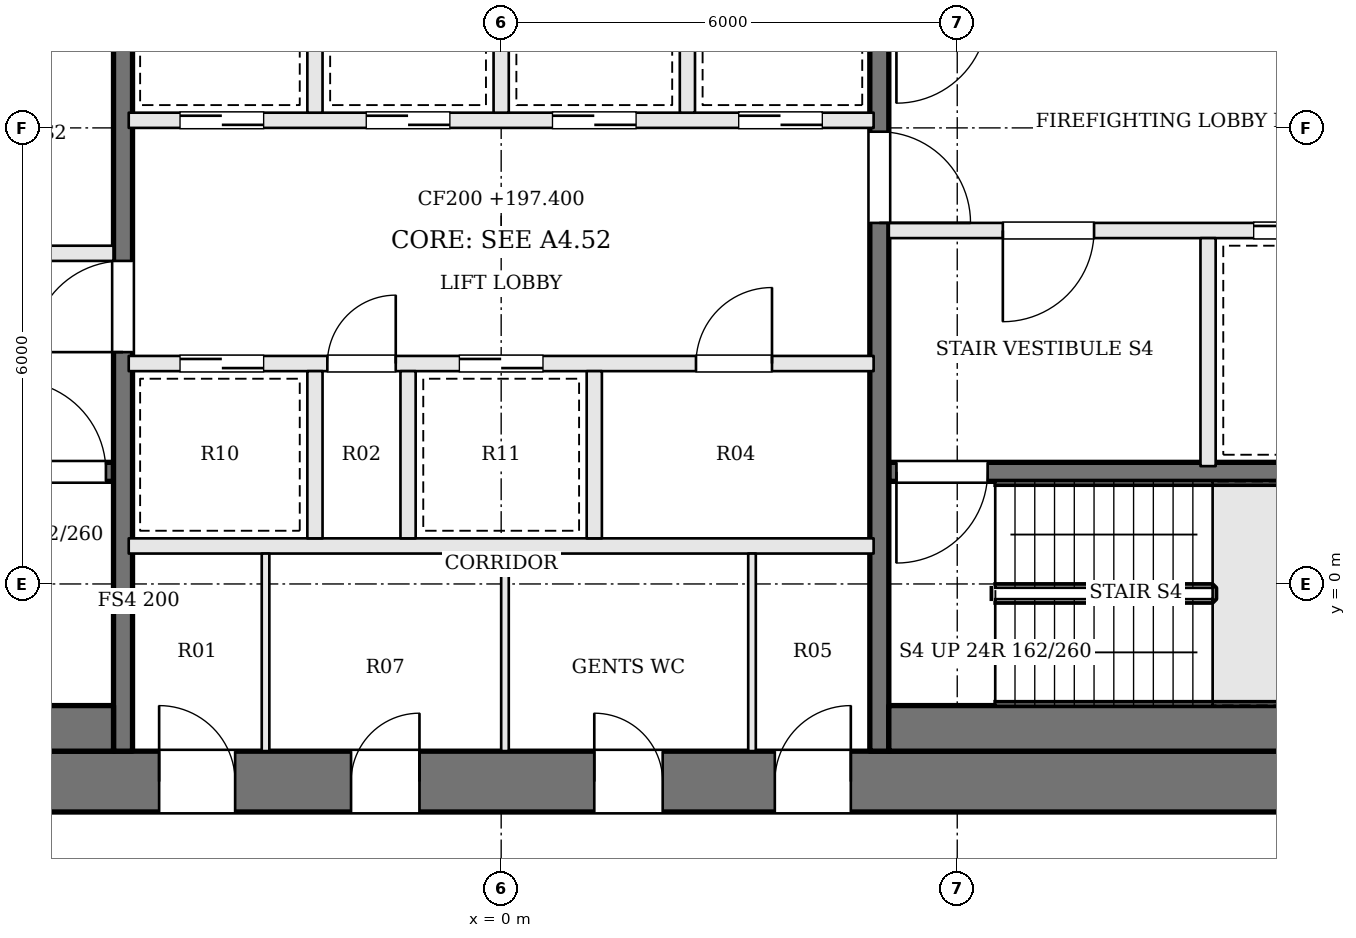
"""IFC4 building model, lengths in metres.
Left out: names, types, materials, properties, quantities, classifications, styles, units other than length and angle.
Written with IfcOpenShell. Run it as: python <this file> out.ifc"""

import sys

from ifc_helpers import new_model, si_unit, direction, frame, frame_2d, origin, place, context, subcontext, project, spatial, rectangle, extrude, element, fill, save


model = new_model("IFC4")
c1 = context("Model", 3, precision=1e-05, world=origin(), true_north=direction((0.0, 1.0)))
c2 = subcontext(c1, "Body", "Model", "MODEL_VIEW")
j1 = project(units=[si_unit("LENGTHUNIT", "METRE"), si_unit("PLANEANGLEUNIT", "RADIAN")], contexts=[c1])
p1 = place(None, origin())
s1 = spatial("IfcSite", under=j1, at=p1, CompositionType="ELEMENT")
p2 = place(p1, origin())
s2 = spatial("IfcBuilding", under=s1, at=p2, CompositionType="ELEMENT")
p3 = place(p2, frame((0.0, 0.0, 197.4)))
s3 = spatial("IfcBuildingStorey", under=s2, at=p3, CompositionType="ELEMENT", Elevation=197.4)
p4 = place(p3, frame((-13.0, -2.6, 0.0), z_axis=(0.0, 0.0, 1.0), x_axis=(1.0, 0.0, 0.0)))
e1 = element("IfcWall", 1, at=p4, inside=s3, PredefinedType="SHEAR", context=c2, shape_type="SweptSolid", body=[
    extrude(rectangle(XDim=26.0, YDim=0.8, at=frame_2d((13.0, 0.0))), origin(), (0.0, 0.0, 1.0), 3.9),
])
p5 = place(p4, frame((8.5, 0.0, 0.0)))
e2 = element("IfcOpeningElement", 2, at=p5, cuts=e1, PredefinedType="OPENING", context=c2, shape_type="SweptSolid", body=[
    extrude(rectangle(XDim=1.0, YDim=2.1, at=frame_2d((0.5, 1.05))), frame((0.0, 0.41, 0.0), z_axis=(0.0, -1.0, 0.0), x_axis=(1.0, 0.0, 0.0)), (0.0, 0.0, 1.0), 0.82),
])
p6 = place(p4, frame((11.025, 0.0, 0.0)))
e3 = element("IfcOpeningElement", 3, at=p6, cuts=e1, PredefinedType="OPENING", context=c2, shape_type="SweptSolid", body=[
    extrude(rectangle(XDim=0.9, YDim=2.1, at=frame_2d((0.45, 1.05))), frame((0.0, 0.41, 0.0), z_axis=(0.0, -1.0, 0.0), x_axis=(1.0, 0.0, 0.0)), (0.0, 0.0, 1.0), 0.82),
])
p7 = place(p4, frame((14.225, 0.0, 0.0)))
e4 = element("IfcOpeningElement", 4, at=p7, cuts=e1, PredefinedType="OPENING", context=c2, shape_type="SweptSolid", body=[
    extrude(rectangle(XDim=0.9, YDim=2.1, at=frame_2d((0.45, 1.05))), frame((0.0, 0.41, 0.0), z_axis=(0.0, -1.0, 0.0), x_axis=(1.0, 0.0, 0.0)), (0.0, 0.0, 1.0), 0.82),
])
p8 = place(p4, frame((16.6, 0.0, 0.0)))
e5 = element("IfcOpeningElement", 5, at=p8, cuts=e1, PredefinedType="OPENING", context=c2, shape_type="SweptSolid", body=[
    extrude(rectangle(XDim=1.0, YDim=2.1, at=frame_2d((0.5, 1.05))), frame((0.0, 0.41, 0.0), z_axis=(0.0, -1.0, 0.0), x_axis=(1.0, 0.0, 0.0)), (0.0, 0.0, 1.0), 0.82),
])
p9 = place(p3, frame((-12.2, 1.475, 0.0), z_axis=(0.0, 0.0, 1.0), x_axis=(1.0, 0.0, 0.0)))
e6 = element("IfcWall", 6, at=p9, inside=s3, PredefinedType="SOLIDWALL", context=c2, shape_type="SweptSolid", body=[
    extrude(rectangle(XDim=7.1, YDim=0.25, at=frame_2d((3.55, 0.0))), origin(), (0.0, 0.0, 1.0), 3.7),
])
p10 = place(p9, frame((5.8, 0.0, 0.0)))
e7 = element("IfcOpeningElement", 7, at=p10, cuts=e6, PredefinedType="OPENING", context=c2, shape_type="SweptSolid", body=[
    extrude(rectangle(XDim=1.2, YDim=2.1, at=frame_2d((0.6, 1.05))), frame((0.0, 0.135, 0.0), z_axis=(0.0, -1.0, 0.0), x_axis=(1.0, 0.0, 0.0)), (0.0, 0.0, 1.0), 0.27),
])
p11 = place(p3, frame((-12.2, 4.35, 0.0), z_axis=(0.0, 0.0, 1.0), x_axis=(1.0, 0.0, 0.0)))
e8 = element("IfcWall", 8, at=p11, inside=s3, PredefinedType="SOLIDWALL", context=c2, shape_type="SweptSolid", body=[
    extrude(rectangle(XDim=7.1, YDim=0.2, at=frame_2d((3.55, 0.0))), origin(), (0.0, 0.0, 1.0), 3.7),
])
p12 = place(p11, frame((4.4, 0.0, 0.0)))
e9 = element("IfcOpeningElement", 9, at=p12, cuts=e8, PredefinedType="OPENING", context=c2, shape_type="SweptSolid", body=[
    extrude(rectangle(XDim=1.2, YDim=2.1, at=frame_2d((0.6, 1.05))), frame((0.0, 0.11, 0.0), z_axis=(0.0, -1.0, 0.0), x_axis=(1.0, 0.0, 0.0)), (0.0, 0.0, 1.0), 0.22),
])
p13 = place(p11, frame((1.1, 0.0, 0.0)))
e10 = element("IfcOpeningElement", 10, at=p13, cuts=e8, PredefinedType="OPENING", context=c2, shape_type="SweptSolid", body=[
    extrude(rectangle(XDim=1.2, YDim=2.1, at=frame_2d((0.6, 1.05))), frame((0.0, 0.11, 0.0), z_axis=(0.0, -1.0, 0.0), x_axis=(1.0, 0.0, 0.0)), (0.0, 0.0, 1.0), 0.22),
])
p14 = place(p3, frame((12.2, 4.65, 0.0), z_axis=(0.0, 0.0, 1.0), x_axis=(-1.0, 0.0, 0.0)))
e11 = element("IfcWall", 11, at=p14, inside=s3, PredefinedType="SOLIDWALL", context=c2, shape_type="SweptSolid", body=[
    extrude(rectangle(XDim=7.1, YDim=0.2, at=frame_2d((3.55, 0.0))), origin(), (0.0, 0.0, 1.0), 3.7),
])
p15 = place(p14, frame((4.4, 0.0, 0.0)))
e12 = element("IfcOpeningElement", 12, at=p15, cuts=e11, PredefinedType="OPENING", context=c2, shape_type="SweptSolid", body=[
    extrude(rectangle(XDim=1.2, YDim=2.1, at=frame_2d((0.6, 1.05))), frame((0.0, 0.11, 0.0), z_axis=(0.0, -1.0, 0.0), x_axis=(1.0, 0.0, 0.0)), (0.0, 0.0, 1.0), 0.22),
])
p16 = place(p14, frame((1.1, 0.0, 0.0)))
e13 = element("IfcOpeningElement", 13, at=p16, cuts=e11, PredefinedType="OPENING", context=c2, shape_type="SweptSolid", body=[
    extrude(rectangle(XDim=1.2, YDim=2.1, at=frame_2d((0.6, 1.05))), frame((0.0, 0.11, 0.0), z_axis=(0.0, -1.0, 0.0), x_axis=(1.0, 0.0, 0.0)), (0.0, 0.0, 1.0), 0.22),
])
p17 = place(p3, frame((12.2, 1.475, 0.0), z_axis=(0.0, 0.0, 1.0), x_axis=(-1.0, 0.0, 0.0)))
e14 = element("IfcWall", 14, at=p17, inside=s3, PredefinedType="SOLIDWALL", context=c2, shape_type="SweptSolid", body=[
    extrude(rectangle(XDim=7.1, YDim=0.25, at=frame_2d((3.55, 0.0))), origin(), (0.0, 0.0, 1.0), 3.7),
])
p18 = place(p17, frame((5.8, 0.0, 0.0)))
e15 = element("IfcOpeningElement", 15, at=p18, cuts=e14, PredefinedType="OPENING", context=c2, shape_type="SweptSolid", body=[
    extrude(rectangle(XDim=1.2, YDim=2.1, at=frame_2d((0.6, 1.05))), frame((0.0, 0.135, 0.0), z_axis=(0.0, -1.0, 0.0), x_axis=(1.0, 0.0, 0.0)), (0.0, 0.0, 1.0), 0.27),
])
p19 = place(p3, frame((9.3, 4.55, 0.0), z_axis=(0.0, 0.0, 1.0), x_axis=(0.0, -1.0, 0.0)))
e16 = element("IfcWall", 16, at=p19, inside=s3, PredefinedType="SOLIDWALL", context=c2, shape_type="SweptSolid", body=[
    extrude(rectangle(XDim=3.0, YDim=0.2, at=frame_2d((1.5, 0.0))), origin(), (0.0, 0.0, 1.0), 3.7),
])
p20 = place(p3, frame((-4.975, -2.2, 0.0), z_axis=(0.0, 0.0, 1.0), x_axis=(0.0, 1.0, 0.0)))
e17 = element("IfcWall", 17, at=p20, inside=s3, PredefinedType="SOLIDWALL", context=c2, shape_type="SweptSolid", body=[
    extrude(rectangle(XDim=13.4, YDim=0.25, at=frame_2d((6.7, 0.0))), origin(), (0.0, 0.0, 1.0), 3.7),
])
p21 = place(p20, frame((5.25, 0.0, 0.0)))
e18 = element("IfcOpeningElement", 18, at=p21, cuts=e17, PredefinedType="OPENING", context=c2, shape_type="SweptSolid", body=[
    extrude(rectangle(XDim=1.2, YDim=2.1, at=frame_2d((0.6, 1.05))), frame((0.0, 0.135, 0.0), z_axis=(0.0, -1.0, 0.0), x_axis=(1.0, 0.0, 0.0)), (0.0, 0.0, 1.0), 0.27),
])
p22 = place(p3, frame((4.975, 11.2, 0.0), z_axis=(0.0, 0.0, 1.0), x_axis=(0.0, -1.0, 0.0)))
e19 = element("IfcWall", 19, at=p22, inside=s3, PredefinedType="SOLIDWALL", context=c2, shape_type="SweptSolid", body=[
    extrude(rectangle(XDim=13.4, YDim=0.25, at=frame_2d((6.7, 0.0))), origin(), (0.0, 0.0, 1.0), 3.7),
])
p23 = place(p22, frame((5.25, 0.0, 0.0)))
e20 = element("IfcOpeningElement", 20, at=p23, cuts=e19, PredefinedType="OPENING", context=c2, shape_type="SweptSolid", body=[
    extrude(rectangle(XDim=1.2, YDim=2.1, at=frame_2d((0.6, 1.05))), frame((0.0, 0.135, 0.0), z_axis=(0.0, -1.0, 0.0), x_axis=(1.0, 0.0, 0.0)), (0.0, 0.0, 1.0), 0.27),
])
for number, where, z_axis, x_axis in (
    (21, (-12.2, -1.9, 0.0), (0.0, 0.0, 1.0), (1.0, 0.0, 0.0)),
    (22, (12.2, -1.9, 0.0), (0.0, 0.0, 1.0), (-1.0, 0.0, 0.0)),
):
    element("IfcWall", number, at=place(p3, frame(where, z_axis=z_axis, x_axis=x_axis)), inside=s3, PredefinedType="SOLIDWALL", context=c2, shape_type="SweptSolid", body=[
        extrude(rectangle(XDim=7.1, YDim=0.6, at=frame_2d((3.55, 0.0))), origin(), (0.0, 0.0, 1.0), 3.7),
    ])
p24 = place(p3, frame((-4.9, 0.5, 0.0), z_axis=(0.0, 0.0, 1.0), x_axis=(1.0, 0.0, 0.0)))
e23 = element("IfcWall", 23, at=p24, inside=s3, PredefinedType="SOLIDWALL", context=c2, shape_type="SweptSolid", body=[
    extrude(rectangle(XDim=9.8, YDim=0.2, at=frame_2d((4.9, 0.0))), origin(), (0.0, 0.0, 1.0), 3.7),
])
p25 = place(p3, frame((-4.9, 2.9, 0.0), z_axis=(0.0, 0.0, 1.0), x_axis=(1.0, 0.0, 0.0)))
e24 = element("IfcWall", 24, at=p25, inside=s3, PredefinedType="SOLIDWALL", context=c2, shape_type="SweptSolid", body=[
    extrude(rectangle(XDim=9.8, YDim=0.2, at=frame_2d((4.9, 0.0))), origin(), (0.0, 0.0, 1.0), 3.7),
])
p26 = place(p25, frame((0.675, 0.0, 0.0)))
e25 = element("IfcOpeningElement", 25, at=p26, cuts=e24, PredefinedType="OPENING", context=c2, shape_type="SweptSolid", body=[
    extrude(rectangle(XDim=1.1, YDim=2.1, at=frame_2d((0.55, 1.05))), frame((0.0, 0.11, 0.0), z_axis=(0.0, -1.0, 0.0), x_axis=(1.0, 0.0, 0.0)), (0.0, 0.0, 1.0), 0.22),
])
p27 = place(p25, frame((2.613, 0.0, 0.0)))
e26 = element("IfcOpeningElement", 26, at=p27, cuts=e24, PredefinedType="OPENING", context=c2, shape_type="SweptSolid", body=[
    extrude(rectangle(XDim=0.9, YDim=2.1, at=frame_2d((0.45, 1.05))), frame((0.0, 0.11, 0.0), z_axis=(0.0, -1.0, 0.0), x_axis=(1.0, 0.0, 0.0)), (0.0, 0.0, 1.0), 0.22),
])
p28 = place(p25, frame((4.35, 0.0, 0.0)))
e27 = element("IfcOpeningElement", 27, at=p28, cuts=e24, PredefinedType="OPENING", context=c2, shape_type="SweptSolid", body=[
    extrude(rectangle(XDim=1.1, YDim=2.1, at=frame_2d((0.55, 1.05))), frame((0.0, 0.11, 0.0), z_axis=(0.0, -1.0, 0.0), x_axis=(1.0, 0.0, 0.0)), (0.0, 0.0, 1.0), 0.22),
])
p29 = place(p25, frame((7.463, 0.0, 0.0)))
e28 = element("IfcOpeningElement", 28, at=p29, cuts=e24, PredefinedType="OPENING", context=c2, shape_type="SweptSolid", body=[
    extrude(rectangle(XDim=1.0, YDim=2.1, at=frame_2d((0.5, 1.05))), frame((0.0, 0.11, 0.0), z_axis=(0.0, -1.0, 0.0), x_axis=(1.0, 0.0, 0.0)), (0.0, 0.0, 1.0), 0.22),
])
p30 = place(p3, frame((-4.9, 6.1, 0.0), z_axis=(0.0, 0.0, 1.0), x_axis=(1.0, 0.0, 0.0)))
e29 = element("IfcWall", 29, at=p30, inside=s3, PredefinedType="SOLIDWALL", context=c2, shape_type="SweptSolid", body=[
    extrude(rectangle(XDim=9.8, YDim=0.2, at=frame_2d((4.9, 0.0))), origin(), (0.0, 0.0, 1.0), 3.7),
])
p31 = place(p30, frame((0.675, 0.0, 0.0)))
e30 = element("IfcOpeningElement", 30, at=p31, cuts=e29, PredefinedType="OPENING", context=c2, shape_type="SweptSolid", body=[
    extrude(rectangle(XDim=1.1, YDim=2.1, at=frame_2d((0.55, 1.05))), frame((0.0, 0.11, 0.0), z_axis=(0.0, -1.0, 0.0), x_axis=(1.0, 0.0, 0.0)), (0.0, 0.0, 1.0), 0.22),
])
p32 = place(p30, frame((3.125, 0.0, 0.0)))
e31 = element("IfcOpeningElement", 31, at=p32, cuts=e29, PredefinedType="OPENING", context=c2, shape_type="SweptSolid", body=[
    extrude(rectangle(XDim=1.1, YDim=2.1, at=frame_2d((0.55, 1.05))), frame((0.0, 0.11, 0.0), z_axis=(0.0, -1.0, 0.0), x_axis=(1.0, 0.0, 0.0)), (0.0, 0.0, 1.0), 0.22),
])
p33 = place(p30, frame((5.575, 0.0, 0.0)))
e32 = element("IfcOpeningElement", 32, at=p33, cuts=e29, PredefinedType="OPENING", context=c2, shape_type="SweptSolid", body=[
    extrude(rectangle(XDim=1.1, YDim=2.1, at=frame_2d((0.55, 1.05))), frame((0.0, 0.11, 0.0), z_axis=(0.0, -1.0, 0.0), x_axis=(1.0, 0.0, 0.0)), (0.0, 0.0, 1.0), 0.22),
])
p34 = place(p30, frame((8.025, 0.0, 0.0)))
e33 = element("IfcOpeningElement", 33, at=p34, cuts=e29, PredefinedType="OPENING", context=c2, shape_type="SweptSolid", body=[
    extrude(rectangle(XDim=1.1, YDim=2.1, at=frame_2d((0.55, 1.05))), frame((0.0, 0.11, 0.0), z_axis=(0.0, -1.0, 0.0), x_axis=(1.0, 0.0, 0.0)), (0.0, 0.0, 1.0), 0.22),
])
for number, where, z_axis, x_axis in (
    (34, (-2.45, 0.6, 0.0), (0.0, 0.0, 1.0), (0.0, 1.0, 0.0)),
    (35, (-1.225, 0.6, 0.0), (0.0, 0.0, 1.0), (0.0, 1.0, 0.0)),
    (36, (1.225, 0.6, 0.0), (0.0, 0.0, 1.0), (0.0, 1.0, 0.0)),
    (37, (-2.45, 6.2, 0.0), (0.0, 0.0, 1.0), (0.0, 1.0, 0.0)),
    (38, (0.0, 6.2, 0.0), (0.0, 0.0, 1.0), (0.0, 1.0, 0.0)),
    (39, (2.45, 6.2, 0.0), (0.0, 0.0, 1.0), (0.0, 1.0, 0.0)),
):
    element("IfcWall", number, at=place(p3, frame(where, z_axis=z_axis, x_axis=x_axis)), inside=s3, PredefinedType="SOLIDWALL", context=c2, shape_type="SweptSolid", body=[
        extrude(rectangle(XDim=2.2, YDim=0.2, at=frame_2d((1.1, 0.0))), origin(), (0.0, 0.0, 1.0), 3.7),
    ])
for number, where, z_axis, x_axis in (
    (40, (-3.1, -2.2, 0.0), (0.0, 0.0, 1.0), (0.0, 1.0, 0.0)),
    (41, (0.05, -2.2, 0.0), (0.0, 0.0, 1.0), (0.0, 1.0, 0.0)),
    (42, (3.3, -2.2, 0.0), (0.0, 0.0, 1.0), (0.0, 1.0, 0.0)),
):
    element("IfcWall", number, at=place(p3, frame(where, z_axis=z_axis, x_axis=x_axis)), inside=s3, PredefinedType="PARTITIONING", context=c2, shape_type="SweptSolid", body=[
        extrude(rectangle(XDim=2.6, YDim=0.1, at=frame_2d((1.3, 0.0))), origin(), (0.0, 0.0, 1.0), 3.7),
    ])
p35 = place(p21, origin())
e43 = element("IfcDoor", 43, at=p35, inside=s3, OperationType="SINGLE_SWING_LEFT", PredefinedType="DOOR", context=c2, shape_type="SweptSolid", body=[
    extrude(rectangle(XDim=1.2, YDim=2.1, at=frame_2d((0.6, 1.05))), frame((0.0, 0.025, 0.0), z_axis=(0.0, -1.0, 0.0), x_axis=(1.0, 0.0, 0.0)), (0.0, 0.0, 1.0), 0.05),
])
fill(e18, e43)
p36 = place(p23, origin())
e44 = element("IfcDoor", 44, at=p36, inside=s3, OperationType="SINGLE_SWING_RIGHT", PredefinedType="DOOR", context=c2, shape_type="SweptSolid", body=[
    extrude(rectangle(XDim=1.2, YDim=2.1, at=frame_2d((0.6, 1.05))), frame((0.0, 0.025, 0.0), z_axis=(0.0, -1.0, 0.0), x_axis=(1.0, 0.0, 0.0)), (0.0, 0.0, 1.0), 0.05),
])
fill(e20, e44)
p37 = place(p15, origin())
e45 = element("IfcDoor", 45, at=p37, inside=s3, OperationType="SINGLE_SWING_RIGHT", PredefinedType="DOOR", context=c2, shape_type="SweptSolid", body=[
    extrude(rectangle(XDim=1.2, YDim=2.1, at=frame_2d((0.6, 1.05))), frame((0.0, 0.025, 0.0), z_axis=(0.0, -1.0, 0.0), x_axis=(1.0, 0.0, 0.0)), (0.0, 0.0, 1.0), 0.05),
])
fill(e12, e45)
p38 = place(p10, origin())
e46 = element("IfcDoor", 46, at=p38, inside=s3, OperationType="SINGLE_SWING_LEFT", PredefinedType="DOOR", context=c2, shape_type="SweptSolid", body=[
    extrude(rectangle(XDim=1.2, YDim=2.1, at=frame_2d((0.6, 1.05))), frame((0.0, 0.025, 0.0), z_axis=(0.0, -1.0, 0.0), x_axis=(1.0, 0.0, 0.0)), (0.0, 0.0, 1.0), 0.05),
])
fill(e7, e46)
p39 = place(p18, origin())
e47 = element("IfcDoor", 47, at=p39, inside=s3, OperationType="SINGLE_SWING_RIGHT", PredefinedType="DOOR", context=c2, shape_type="SweptSolid", body=[
    extrude(rectangle(XDim=1.2, YDim=2.1, at=frame_2d((0.6, 1.05))), frame((0.0, 0.025, 0.0), z_axis=(0.0, -1.0, 0.0), x_axis=(1.0, 0.0, 0.0)), (0.0, 0.0, 1.0), 0.05),
])
fill(e15, e47)
p40 = place(p16, origin())
e48 = element("IfcDoor", 48, at=p40, inside=s3, OperationType="SLIDING_TO_RIGHT", PredefinedType="DOOR", context=c2, shape_type="SweptSolid", body=[
    extrude(rectangle(XDim=1.2, YDim=2.1, at=frame_2d((0.6, 1.05))), frame((0.0, 0.025, 0.0), z_axis=(0.0, -1.0, 0.0), x_axis=(1.0, 0.0, 0.0)), (0.0, 0.0, 1.0), 0.05),
])
fill(e13, e48)
p41 = place(p26, origin())
e49 = element("IfcDoor", 49, at=p41, inside=s3, OperationType="SLIDING_TO_RIGHT", PredefinedType="DOOR", context=c2, shape_type="SweptSolid", body=[
    extrude(rectangle(XDim=1.1, YDim=2.1, at=frame_2d((0.55, 1.05))), frame((0.0, 0.025, 0.0), z_axis=(0.0, -1.0, 0.0), x_axis=(1.0, 0.0, 0.0)), (0.0, 0.0, 1.0), 0.05),
])
fill(e25, e49)
p42 = place(p27, origin())
e50 = element("IfcDoor", 50, at=p42, inside=s3, OperationType="SINGLE_SWING_RIGHT", PredefinedType="DOOR", context=c2, shape_type="SweptSolid", body=[
    extrude(rectangle(XDim=0.9, YDim=2.1, at=frame_2d((0.45, 1.05))), frame((0.0, 0.025, 0.0), z_axis=(0.0, -1.0, 0.0), x_axis=(1.0, 0.0, 0.0)), (0.0, 0.0, 1.0), 0.05),
])
fill(e26, e50)
p43 = place(p28, origin())
e51 = element("IfcDoor", 51, at=p43, inside=s3, OperationType="SLIDING_TO_LEFT", PredefinedType="DOOR", context=c2, shape_type="SweptSolid", body=[
    extrude(rectangle(XDim=1.1, YDim=2.1, at=frame_2d((0.55, 1.05))), frame((0.0, 0.025, 0.0), z_axis=(0.0, -1.0, 0.0), x_axis=(1.0, 0.0, 0.0)), (0.0, 0.0, 1.0), 0.05),
])
fill(e27, e51)
p44 = place(p29, origin())
e52 = element("IfcDoor", 52, at=p44, inside=s3, OperationType="SINGLE_SWING_RIGHT", PredefinedType="DOOR", context=c2, shape_type="SweptSolid", body=[
    extrude(rectangle(XDim=1.0, YDim=2.1, at=frame_2d((0.5, 1.05))), frame((0.0, 0.025, 0.0), z_axis=(0.0, -1.0, 0.0), x_axis=(1.0, 0.0, 0.0)), (0.0, 0.0, 1.0), 0.05),
])
fill(e28, e52)
p45 = place(p31, origin())
e53 = element("IfcDoor", 53, at=p45, inside=s3, OperationType="SLIDING_TO_RIGHT", PredefinedType="DOOR", context=c2, shape_type="SweptSolid", body=[
    extrude(rectangle(XDim=1.1, YDim=2.1, at=frame_2d((0.55, 1.05))), frame((0.0, 0.025, 0.0), z_axis=(0.0, -1.0, 0.0), x_axis=(1.0, 0.0, 0.0)), (0.0, 0.0, 1.0), 0.05),
])
fill(e30, e53)
p46 = place(p32, origin())
e54 = element("IfcDoor", 54, at=p46, inside=s3, OperationType="SLIDING_TO_LEFT", PredefinedType="DOOR", context=c2, shape_type="SweptSolid", body=[
    extrude(rectangle(XDim=1.1, YDim=2.1, at=frame_2d((0.55, 1.05))), frame((0.0, 0.025, 0.0), z_axis=(0.0, -1.0, 0.0), x_axis=(1.0, 0.0, 0.0)), (0.0, 0.0, 1.0), 0.05),
])
fill(e31, e54)
p47 = place(p33, origin())
e55 = element("IfcDoor", 55, at=p47, inside=s3, OperationType="SLIDING_TO_RIGHT", PredefinedType="DOOR", context=c2, shape_type="SweptSolid", body=[
    extrude(rectangle(XDim=1.1, YDim=2.1, at=frame_2d((0.55, 1.05))), frame((0.0, 0.025, 0.0), z_axis=(0.0, -1.0, 0.0), x_axis=(1.0, 0.0, 0.0)), (0.0, 0.0, 1.0), 0.05),
])
fill(e32, e55)
p48 = place(p34, origin())
e56 = element("IfcDoor", 56, at=p48, inside=s3, OperationType="SLIDING_TO_LEFT", PredefinedType="DOOR", context=c2, shape_type="SweptSolid", body=[
    extrude(rectangle(XDim=1.1, YDim=2.1, at=frame_2d((0.55, 1.05))), frame((0.0, 0.025, 0.0), z_axis=(0.0, -1.0, 0.0), x_axis=(1.0, 0.0, 0.0)), (0.0, 0.0, 1.0), 0.05),
])
fill(e33, e56)
p49 = place(p5, origin())
e57 = element("IfcDoor", 57, at=p49, inside=s3, OperationType="SINGLE_SWING_LEFT", PredefinedType="DOOR", context=c2, shape_type="SweptSolid", body=[
    extrude(rectangle(XDim=1.0, YDim=2.1, at=frame_2d((0.5, 1.05))), frame((0.0, 0.025, 0.0), z_axis=(0.0, -1.0, 0.0), x_axis=(1.0, 0.0, 0.0)), (0.0, 0.0, 1.0), 0.05),
])
fill(e2, e57)
p50 = place(p6, origin())
e58 = element("IfcDoor", 58, at=p50, inside=s3, OperationType="SINGLE_SWING_RIGHT", PredefinedType="DOOR", context=c2, shape_type="SweptSolid", body=[
    extrude(rectangle(XDim=0.9, YDim=2.1, at=frame_2d((0.45, 1.05))), frame((0.0, 0.025, 0.0), z_axis=(0.0, -1.0, 0.0), x_axis=(1.0, 0.0, 0.0)), (0.0, 0.0, 1.0), 0.05),
])
fill(e3, e58)
p51 = place(p7, origin())
e59 = element("IfcDoor", 59, at=p51, inside=s3, OperationType="SINGLE_SWING_LEFT", PredefinedType="DOOR", context=c2, shape_type="SweptSolid", body=[
    extrude(rectangle(XDim=0.9, YDim=2.1, at=frame_2d((0.45, 1.05))), frame((0.0, 0.025, 0.0), z_axis=(0.0, -1.0, 0.0), x_axis=(1.0, 0.0, 0.0)), (0.0, 0.0, 1.0), 0.05),
])
fill(e4, e59)
p52 = place(p8, origin())
e60 = element("IfcDoor", 60, at=p52, inside=s3, OperationType="SINGLE_SWING_RIGHT", PredefinedType="DOOR", context=c2, shape_type="SweptSolid", body=[
    extrude(rectangle(XDim=1.0, YDim=2.1, at=frame_2d((0.5, 1.05))), frame((0.0, 0.025, 0.0), z_axis=(0.0, -1.0, 0.0), x_axis=(1.0, 0.0, 0.0)), (0.0, 0.0, 1.0), 0.05),
])
fill(e5, e60)
save(model, sys.argv[1])
